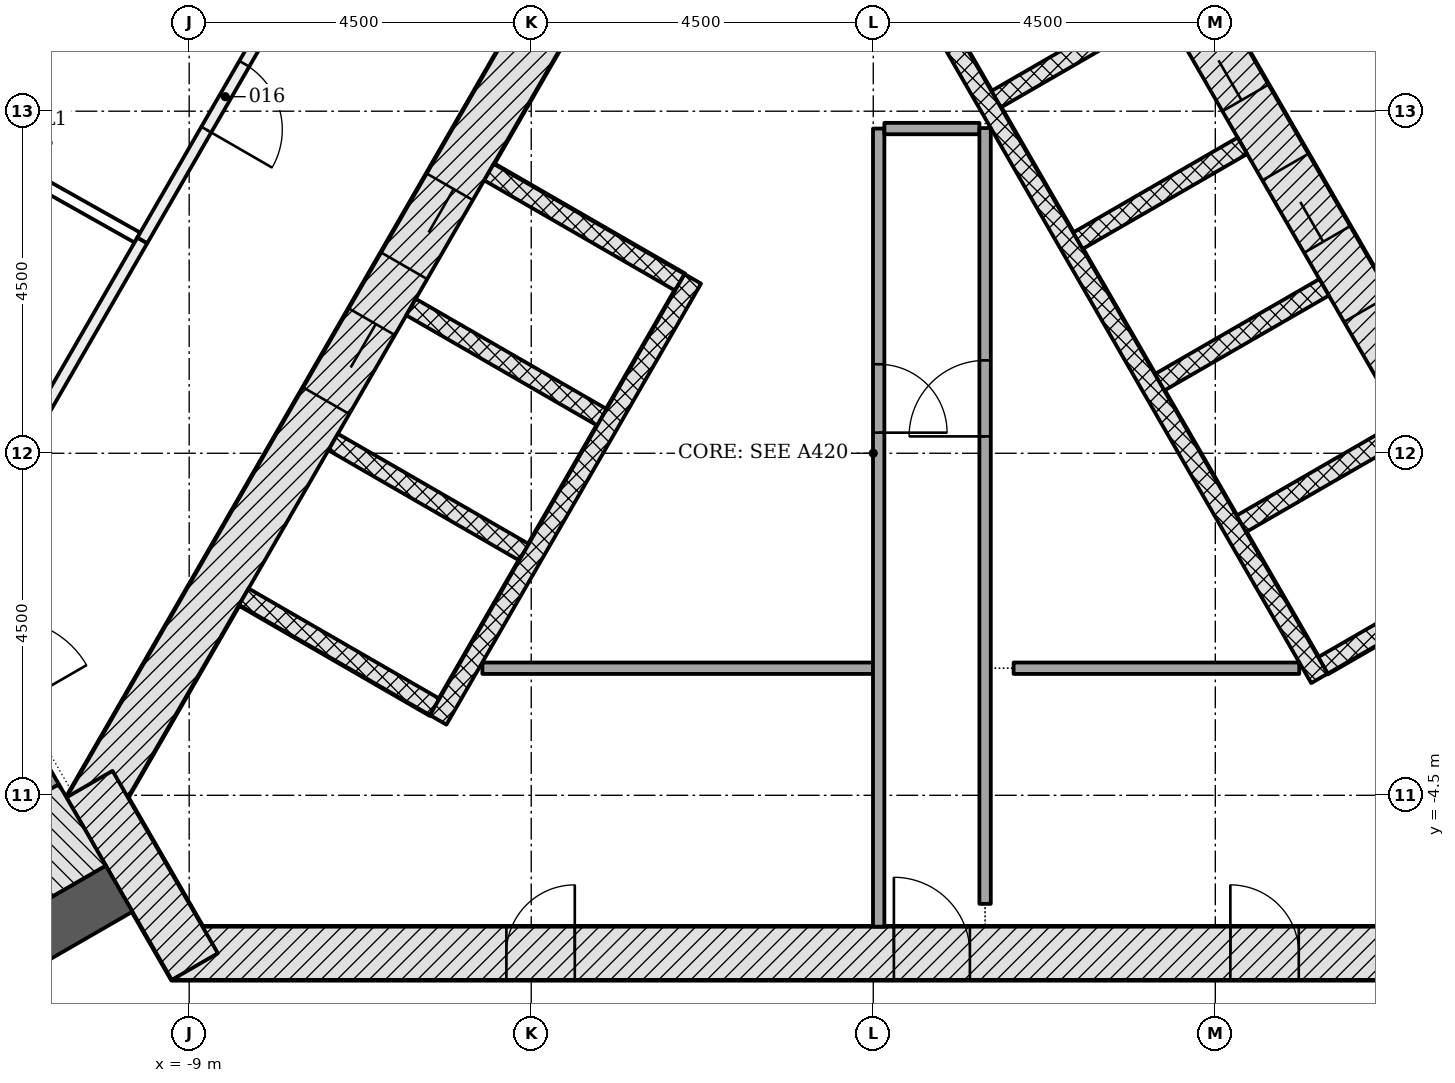
"""IFC4 building model, lengths in metres.
Left out: names, types, materials, properties, quantities, classifications, styles, units other than length and angle.
Written with IfcOpenShell. Run it as: python <this file> out.ifc"""

import sys

from ifc_helpers import new_model, si_unit, direction, frame, frame_2d, origin, place, context, subcontext, project, spatial, rectangle, extrude, element, fill, save


model = new_model("IFC4")
c1 = context("Model", 3, precision=1e-05, world=origin(), true_north=direction((0.0, 1.0)))
c2 = subcontext(c1, "Body", "Model", "MODEL_VIEW")
j1 = project(units=[si_unit("LENGTHUNIT", "METRE"), si_unit("PLANEANGLEUNIT", "RADIAN")], contexts=[c1])
p1 = place(None, origin())
s1 = spatial("IfcSite", under=j1, at=p1, CompositionType="ELEMENT")
p2 = place(p1, origin())
s2 = spatial("IfcBuilding", under=s1, at=p2, CompositionType="ELEMENT")
p3 = place(p2, frame((0.0, 0.0, 185.1)))
s3 = spatial("IfcBuildingStorey", under=s2, at=p3, CompositionType="ELEMENT", Elevation=185.1)
p4 = place(p3, frame((-9.229, -6.578, -0.2), z_axis=(0.0, 0.0, 1.0), x_axis=(1.0, 0.0, 0.0)))
e1 = element("IfcWall", 1, at=p4, inside=s3, PredefinedType="SHEAR", context=c2, shape_type="SweptSolid", body=[
    extrude(rectangle(XDim=18.458, YDim=0.7, at=frame_2d((9.229, 0.0))), origin(), (0.0, 0.0, 1.0), 3.6),
])
p5 = place(p4, frame((9.5, 0.0, 0.2)))
e2 = element("IfcOpeningElement", 2, at=p5, cuts=e1, PredefinedType="OPENING", context=c2, shape_type="SweptSolid", body=[
    extrude(rectangle(XDim=1.0, YDim=2.1, at=frame_2d((0.5, 1.05))), frame((0.0, 0.36, 0.0), z_axis=(0.0, -1.0, 0.0), x_axis=(1.0, 0.0, 0.0)), (0.0, 0.0, 1.0), 0.72),
])
p6 = place(p4, frame((4.402, 0.0, 0.2)))
e3 = element("IfcOpeningElement", 3, at=p6, cuts=e1, PredefinedType="OPENING", context=c2, shape_type="SweptSolid", body=[
    extrude(rectangle(XDim=0.9, YDim=2.1, at=frame_2d((0.45, 1.05))), frame((0.0, 0.36, 0.0), z_axis=(0.0, -1.0, 0.0), x_axis=(1.0, 0.0, 0.0)), (0.0, 0.0, 1.0), 0.72),
])
p7 = place(p4, frame((13.927, 0.0, 0.2)))
e4 = element("IfcOpeningElement", 4, at=p7, cuts=e1, PredefinedType="OPENING", context=c2, shape_type="SweptSolid", body=[
    extrude(rectangle(XDim=0.9, YDim=2.1, at=frame_2d((0.45, 1.05))), frame((0.0, 0.36, 0.0), z_axis=(0.0, -1.0, 0.0), x_axis=(1.0, 0.0, 0.0)), (0.0, 0.0, 1.0), 0.72),
])
p8 = place(p3, frame((10.311, -4.703, -0.2), z_axis=(0.0, 0.0, 1.0), x_axis=(-0.500001446645, 0.866024568562, 0.0)))
e5 = element("IfcWall", 5, at=p8, inside=s3, PredefinedType="SHEAR", context=c2, shape_type="SweptSolid", body=[
    extrude(rectangle(XDim=18.458, YDim=0.7, at=frame_2d((9.229, 0.0))), origin(), (0.0, 0.0, 1.0), 3.6),
])
p9 = place(p8, frame((4.379, 0.0, 0.2)))
e6 = element("IfcOpeningElement", 6, at=p9, cuts=e5, PredefinedType="OPENING", context=c2, shape_type="SweptSolid", body=[
    extrude(rectangle(XDim=1.1, YDim=2.1, at=frame_2d((0.55, 1.05))), frame((0.0, 0.36, 0.0), z_axis=(0.0, -1.0, 0.0), x_axis=(1.0, 0.0, 0.0)), (0.0, 0.0, 1.0), 0.72),
])
p10 = place(p8, frame((6.529, 0.0, 0.2)))
e7 = element("IfcOpeningElement", 7, at=p10, cuts=e5, PredefinedType="OPENING", context=c2, shape_type="SweptSolid", body=[
    extrude(rectangle(XDim=1.1, YDim=2.1, at=frame_2d((0.55, 1.05))), frame((0.0, 0.36, 0.0), z_axis=(0.0, -1.0, 0.0), x_axis=(1.0, 0.0, 0.0)), (0.0, 0.0, 1.0), 0.72),
])
p11 = place(p8, frame((8.679, 0.0, 0.2)))
e8 = element("IfcOpeningElement", 8, at=p11, cuts=e5, PredefinedType="OPENING", context=c2, shape_type="SweptSolid", body=[
    extrude(rectangle(XDim=1.1, YDim=2.1, at=frame_2d((0.55, 1.05))), frame((0.0, 0.36, 0.0), z_axis=(0.0, -1.0, 0.0), x_axis=(1.0, 0.0, 0.0)), (0.0, 0.0, 1.0), 0.72),
])
p12 = place(p8, frame((10.829, 0.0, 0.2)))
e9 = element("IfcOpeningElement", 9, at=p12, cuts=e5, PredefinedType="OPENING", context=c2, shape_type="SweptSolid", body=[
    extrude(rectangle(XDim=1.1, YDim=2.1, at=frame_2d((0.55, 1.05))), frame((0.0, 0.36, 0.0), z_axis=(0.0, -1.0, 0.0), x_axis=(1.0, 0.0, 0.0)), (0.0, 0.0, 1.0), 0.72),
])
p13 = place(p8, frame((12.979, 0.0, 0.2)))
e10 = element("IfcOpeningElement", 10, at=p13, cuts=e5, PredefinedType="OPENING", context=c2, shape_type="SweptSolid", body=[
    extrude(rectangle(XDim=1.1, YDim=2.1, at=frame_2d((0.55, 1.05))), frame((0.0, 0.36, 0.0), z_axis=(0.0, -1.0, 0.0), x_axis=(1.0, 0.0, 0.0)), (0.0, 0.0, 1.0), 0.72),
])
p14 = place(p3, frame((-1.083, 11.281, -0.2), z_axis=(0.0, 0.0, 1.0), x_axis=(-0.500001446645, -0.866024568562, 0.0)))
e11 = element("IfcWall", 11, at=p14, inside=s3, PredefinedType="SHEAR", context=c2, shape_type="SweptSolid", body=[
    extrude(rectangle(XDim=18.458, YDim=0.7, at=frame_2d((9.229, 0.0))), origin(), (0.0, 0.0, 1.0), 3.6),
])
p15 = place(p14, frame((8.979, 0.0, 0.2)))
e12 = element("IfcOpeningElement", 12, at=p15, cuts=e11, PredefinedType="OPENING", context=c2, shape_type="SweptSolid", body=[
    extrude(rectangle(XDim=1.2, YDim=2.1, at=frame_2d((0.6, 1.05))), frame((0.0, 0.36, 0.0), z_axis=(0.0, -1.0, 0.0), x_axis=(1.0, 0.0, 0.0)), (0.0, 0.0, 1.0), 0.72),
])
p16 = place(p14, frame((11.029, 0.0, 0.2)))
e13 = element("IfcOpeningElement", 13, at=p16, cuts=e11, PredefinedType="OPENING", context=c2, shape_type="SweptSolid", body=[
    extrude(rectangle(XDim=1.2, YDim=2.1, at=frame_2d((0.6, 1.05))), frame((0.0, 0.36, 0.0), z_axis=(0.0, -1.0, 0.0), x_axis=(1.0, 0.0, 0.0)), (0.0, 0.0, 1.0), 0.72),
])
p17 = place(p3, frame((-10.311, -4.353, -0.2), z_axis=(0.0, 0.0, 1.0), x_axis=(0.500042739161, -0.866000726912, 0.0)))
e14 = element("IfcWall", 14, at=p17, inside=s3, PredefinedType="SHEAR", context=c2, shape_type="SweptSolid", body=[
    extrude(rectangle(XDim=2.771, YDim=0.7, at=frame_2d((1.386, 0.0))), origin(), (0.0, 0.0, 1.0), 3.6),
])
p18 = place(p3, frame((-9.922, -5.728, -0.2), z_axis=(0.0, 0.0, 1.0), x_axis=(-0.866025463095, -0.499999897272, 0.0)))
e15 = element("IfcWall", 15, at=p18, inside=s3, PredefinedType="SHEAR", context=c2, shape_type="SweptSolid", body=[
    extrude(rectangle(XDim=9.521, YDim=0.7, at=frame_2d((4.761, 0.0))), origin(), (0.0, 0.0, 1.0), 3.6),
])
for number, where, z_axis, x_axis in (
    (16, (8.081, -1.541, -0.2), (0.0, 0.0, 1.0), (-0.866, -0.5, 0.0)),
    (17, (7.006, 0.321, -0.2), (0.0, 0.0, 1.0), (-0.866, -0.5, 0.0)),
):
    element("IfcWall", number, at=place(p3, frame(where, z_axis=z_axis, x_axis=x_axis)), inside=s3, PredefinedType="PARTITIONING", context=c2, shape_type="SweptSolid", body=[
        extrude(rectangle(XDim=2.5, YDim=0.25, at=frame_2d((1.25, 0.0))), origin(), (0.0, 0.0, 1.0), 3.6),
    ])
p19 = place(p3, frame((5.931, 2.183, -0.2), z_axis=(0.0, 0.0, 1.0), x_axis=(-0.866047370643, -0.499961950354, 0.0)))
e18 = element("IfcWall", 18, at=p19, inside=s3, PredefinedType="PARTITIONING", context=c2, shape_type="SweptSolid", body=[
    extrude(rectangle(XDim=2.5, YDim=0.25, at=frame_2d((1.25, 0.0))), origin(), (0.0, 0.0, 1.0), 3.6),
])
for number, where, z_axis, x_axis in (
    (19, (4.856, 4.045, -0.2), (0.0, 0.0, 1.0), (-0.866, -0.5, 0.0)),
    (20, (3.781, 5.907, -0.2), (0.0, 0.0, 1.0), (-0.866, -0.5, 0.0)),
):
    element("IfcWall", number, at=place(p3, frame(where, z_axis=z_axis, x_axis=x_axis)), inside=s3, PredefinedType="PARTITIONING", context=c2, shape_type="SweptSolid", body=[
        extrude(rectangle(XDim=2.5, YDim=0.25, at=frame_2d((1.25, 0.0))), origin(), (0.0, 0.0, 1.0), 3.6),
    ])
p20 = place(p3, frame((5.87, -2.961, 0.0), z_axis=(0.0, 0.0, 1.0), x_axis=(-0.50000615651, 0.866021849293, 0.0)))
e21 = element("IfcWall", 21, at=p20, inside=s3, PredefinedType="PARTITIONING", context=c2, shape_type="SweptSolid", body=[
    extrude(rectangle(XDim=11.0, YDim=0.25, at=frame_2d((5.5, 0.0))), origin(), (0.0, 0.0, 1.0), 3.4),
])
for number, where, z_axis, x_axis in (
    (22, (-5.056, 3.699, -0.2), (0.0, 0.0, 1.0), (0.866, -0.5, 0.0)),
    (23, (-6.081, 1.923, -0.2), (0.0, 0.0, 1.0), (0.866, -0.5, 0.0)),
    (24, (-7.106, 0.148, -0.2), (0.0, 0.0, 1.0), (0.866, -0.5, 0.0)),
    (25, (-8.281, -1.887, -0.2), (0.0, 0.0, 1.0), (0.866, -0.5, 0.0)),
):
    element("IfcWall", number, at=place(p3, frame(where, z_axis=z_axis, x_axis=x_axis)), inside=s3, PredefinedType="PARTITIONING", context=c2, shape_type="SweptSolid", body=[
        extrude(rectangle(XDim=2.9, YDim=0.25, at=frame_2d((1.45, 0.0))), origin(), (0.0, 0.0, 1.0), 3.6),
    ])
p21 = place(p3, frame((-2.374, 2.294, 0.0), z_axis=(0.0, 0.0, 1.0), x_axis=(-0.500003174267, -0.866023571113, 0.0)))
e26 = element("IfcWall", 26, at=p21, inside=s3, PredefinedType="PARTITIONING", context=c2, shape_type="SweptSolid", body=[
    extrude(rectangle(XDim=6.7, YDim=0.25, at=frame_2d((3.35, 0.0))), origin(), (0.0, 0.0, 1.0), 3.4),
])
p22 = place(p3, frame((-5.142, -2.828, 0.0), z_axis=(0.0, 0.0, 1.0), x_axis=(1.0, 0.0, 0.0)))
e27 = element("IfcWall", 27, at=p22, inside=s3, PredefinedType="PARTITIONING", context=c2, shape_type="SweptSolid", body=[
    extrude(rectangle(XDim=5.139, YDim=0.15, at=frame_2d((2.569, 0.0))), origin(), (0.0, 0.0, 1.0), 3.4),
])
p23 = place(p3, frame((0.071, 4.272, 0.0), z_axis=(0.0, 0.0, 1.0), x_axis=(0.0, -1.0, 0.0)))
e28 = element("IfcWall", 28, at=p23, inside=s3, PredefinedType="PARTITIONING", context=c2, shape_type="SweptSolid", body=[
    extrude(rectangle(XDim=10.5, YDim=0.15, at=frame_2d((5.25, 0.0))), origin(), (0.0, 0.0, 1.0), 3.4),
])
p24 = place(p23, frame((3.101, 0.0, 0.0)))
e29 = element("IfcOpeningElement", 29, at=p24, cuts=e28, PredefinedType="OPENING", context=c2, shape_type="SweptSolid", body=[
    extrude(rectangle(XDim=0.9, YDim=2.1, at=frame_2d((0.45, 1.05))), frame((0.0, 0.085, 0.0), z_axis=(0.0, -1.0, 0.0), x_axis=(1.0, 0.0, 0.0)), (0.0, 0.0, 1.0), 0.17),
])
p25 = place(p3, frame((0.146, 4.272, 0.0), z_axis=(0.0, 0.0, 1.0), x_axis=(1.0, 0.0, 0.0)))
e30 = element("IfcWall", 30, at=p25, inside=s3, PredefinedType="PARTITIONING", context=c2, shape_type="SweptSolid", body=[
    extrude(rectangle(XDim=1.25, YDim=0.15, at=frame_2d((0.625, 0.0))), origin(), (0.0, 0.0, 1.0), 3.4),
])
p26 = place(p3, frame((1.471, -5.928, 0.0), z_axis=(0.0, 0.0, 1.0), x_axis=(0.0, 1.0, 0.0)))
e31 = element("IfcWall", 31, at=p26, inside=s3, PredefinedType="PARTITIONING", context=c2, shape_type="SweptSolid", body=[
    extrude(rectangle(XDim=10.206, YDim=0.15, at=frame_2d((5.103, 0.0))), origin(), (0.0, 0.0, 1.0), 3.4),
])
p27 = place(p26, frame((6.15, 0.0, 0.0)))
e32 = element("IfcOpeningElement", 32, at=p27, cuts=e31, PredefinedType="OPENING", context=c2, shape_type="SweptSolid", body=[
    extrude(rectangle(XDim=1.0, YDim=2.1, at=frame_2d((0.5, 1.05))), frame((0.0, 0.085, 0.0), z_axis=(0.0, -1.0, 0.0), x_axis=(1.0, 0.0, 0.0)), (0.0, 0.0, 1.0), 0.17),
])
p28 = place(p3, frame((1.846, -2.828, 0.0), z_axis=(0.0, 0.0, 1.0), x_axis=(1.0, 0.0, 0.0)))
e33 = element("IfcWall", 33, at=p28, inside=s3, PredefinedType="PARTITIONING", context=c2, shape_type="SweptSolid", body=[
    extrude(rectangle(XDim=3.758, YDim=0.15, at=frame_2d((1.879, 0.0))), origin(), (0.0, 0.0, 1.0), 3.4),
])
p29 = place(p3, frame((-12.576, -1.331, -0.2), z_axis=(0.0, 0.0, 1.0), x_axis=(0.499970499736, -0.8660424351, 0.0)))
e34 = element("IfcWall", 34, at=p29, inside=s3, PredefinedType="SHEAR", context=c2, shape_type="SweptSolid", body=[
    extrude(rectangle(XDim=3.55, YDim=0.2, at=frame_2d((1.775, 0.0))), origin(), (0.0, 0.0, 1.0), 3.6),
])
p30 = place(p29, frame((1.175, 0.0, 0.2)))
e35 = element("IfcOpeningElement", 35, at=p30, cuts=e34, PredefinedType="OPENING", context=c2, shape_type="SweptSolid", body=[
    extrude(rectangle(XDim=1.2, YDim=2.1, at=frame_2d((0.6, 1.05))), frame((0.0, 0.11, 0.0), z_axis=(0.0, -1.0, 0.0), x_axis=(1.0, 0.0, 0.0)), (0.0, 0.0, 1.0), 0.22),
])
p31 = place(p3, frame((-10.406, -4.89, -0.2), z_axis=(0.0, 0.0, 1.0), x_axis=(-0.866018442252, -0.500012057535, 0.0)))
e36 = element("IfcWall", 36, at=p31, inside=s3, PredefinedType="SHEAR", context=c2, shape_type="SweptSolid", body=[
    extrude(rectangle(XDim=7.2, YDim=1.236, at=frame_2d((3.6, 0.0))), origin(), (0.0, 0.0, 1.0), 3.6),
])
p32 = place(p3, frame((11.247, -0.824, 0.0), z_axis=(0.0, 0.0, 1.0), x_axis=(-0.499997921847, 0.866026603603, 0.0)))
e37 = element("IfcWall", 37, at=p32, inside=s3, PredefinedType="PARTITIONING", context=c2, shape_type="SweptSolid", body=[
    extrude(rectangle(XDim=14.065, YDim=0.15, at=frame_2d((7.032, 0.0))), origin(), (0.0, 0.0, 1.0), 2.847),
])
p33 = place(p32, frame((11.953, 0.0, 0.0)))
e38 = element("IfcOpeningElement", 38, at=p33, cuts=e37, PredefinedType="OPENING", context=c2, shape_type="SweptSolid", body=[
    extrude(rectangle(XDim=1.0, YDim=2.1, at=frame_2d((0.5, 1.05))), frame((0.0, 0.085, 0.0), z_axis=(0.0, -1.0, 0.0), x_axis=(1.0, 0.0, 0.0)), (0.0, 0.0, 1.0), 0.17),
])
p34 = place(p3, frame((-9.616, 2.801, 0.0), z_axis=(0.0, 0.0, 1.0), x_axis=(-0.499995206172, -0.866028171485, 0.0)))
e39 = element("IfcWall", 39, at=p34, inside=s3, PredefinedType="PARTITIONING", context=c2, shape_type="SweptSolid", body=[
    extrude(rectangle(XDim=5.114, YDim=0.15, at=frame_2d((2.557, 0.0))), origin(), (0.0, 0.0, 1.0), 2.852),
])
p35 = place(p3, frame((-14.474, 5.536, 0.0), z_axis=(0.0, 0.0, 1.0), x_axis=(0.871324088074, -0.490707992132, 0.0)))
e40 = element("IfcWall", 40, at=p35, inside=s3, PredefinedType="PARTITIONING", context=c2, shape_type="SweptSolid", body=[
    extrude(rectangle(XDim=5.5, YDim=0.15, at=frame_2d((2.75, 0.0))), origin(), (0.0, 0.0, 1.0), 3.4),
])
p36 = place(p35, frame((2.287, 0.0, 0.0)))
e41 = element("IfcOpeningElement", 41, at=p36, cuts=e40, PredefinedType="OPENING", context=c2, shape_type="SweptSolid", body=[
    extrude(rectangle(XDim=1.0, YDim=2.1, at=frame_2d((0.5, 1.05))), frame((0.0, 0.085, 0.0), z_axis=(0.0, -1.0, 0.0), x_axis=(1.0, 0.0, 0.0)), (0.0, 0.0, 1.0), 0.17),
])
p37 = place(p3, frame((-7.434, 6.581, 0.0), z_axis=(0.0, 0.0, 1.0), x_axis=(-0.499964504253, -0.866045896294, 0.0)))
e42 = element("IfcWall", 42, at=p37, inside=s3, PredefinedType="PARTITIONING", context=c2, shape_type="SweptSolid", body=[
    extrude(rectangle(XDim=4.365, YDim=0.15, at=frame_2d((2.183, 0.0))), origin(), (0.0, 0.0, 1.0), 2.847),
])
p38 = place(p37, frame((1.683, 0.0, 0.0)))
e43 = element("IfcOpeningElement", 43, at=p38, cuts=e42, PredefinedType="OPENING", context=c2, shape_type="SweptSolid", body=[
    extrude(rectangle(XDim=1.0, YDim=2.1, at=frame_2d((0.5, 1.05))), frame((0.0, 0.085, 0.0), z_axis=(0.0, -1.0, 0.0), x_axis=(1.0, 0.0, 0.0)), (0.0, 0.0, 1.0), 0.17),
])
p39 = place(p10, origin())
e44 = element("IfcDoor", 44, at=p39, inside=s3, OperationType="DOUBLE_DOOR_SLIDING", PredefinedType="DOOR", context=c2, shape_type="SweptSolid", body=[
    extrude(rectangle(XDim=1.1, YDim=2.1, at=frame_2d((0.55, 1.05))), frame((0.0, 0.025, 0.0), z_axis=(0.0, -1.0, 0.0), x_axis=(1.0, 0.0, 0.0)), (0.0, 0.0, 1.0), 0.05),
])
fill(e7, e44)
p40 = place(p11, origin())
e45 = element("IfcDoor", 45, at=p40, inside=s3, OperationType="DOUBLE_DOOR_SLIDING", PredefinedType="DOOR", context=c2, shape_type="SweptSolid", body=[
    extrude(rectangle(XDim=1.1, YDim=2.1, at=frame_2d((0.55, 1.05))), frame((0.0, 0.025, 0.0), z_axis=(0.0, -1.0, 0.0), x_axis=(1.0, 0.0, 0.0)), (0.0, 0.0, 1.0), 0.05),
])
fill(e8, e45)
p41 = place(p12, origin())
e46 = element("IfcDoor", 46, at=p41, inside=s3, OperationType="DOUBLE_DOOR_SLIDING", PredefinedType="DOOR", context=c2, shape_type="SweptSolid", body=[
    extrude(rectangle(XDim=1.1, YDim=2.1, at=frame_2d((0.55, 1.05))), frame((0.0, 0.025, 0.0), z_axis=(0.0, -1.0, 0.0), x_axis=(1.0, 0.0, 0.0)), (0.0, 0.0, 1.0), 0.05),
])
fill(e9, e46)
p42 = place(p15, origin())
e47 = element("IfcDoor", 47, at=p42, inside=s3, OperationType="DOUBLE_DOOR_SLIDING", PredefinedType="DOOR", context=c2, shape_type="SweptSolid", body=[
    extrude(rectangle(XDim=1.2, YDim=2.1, at=frame_2d((0.6, 1.05))), frame((0.0, 0.025, 0.0), z_axis=(0.0, -1.0, 0.0), x_axis=(1.0, 0.0, 0.0)), (0.0, 0.0, 1.0), 0.05),
])
fill(e12, e47)
p43 = place(p16, origin())
e48 = element("IfcDoor", 48, at=p43, inside=s3, OperationType="DOUBLE_DOOR_SLIDING", PredefinedType="DOOR", context=c2, shape_type="SweptSolid", body=[
    extrude(rectangle(XDim=1.2, YDim=2.1, at=frame_2d((0.6, 1.05))), frame((0.0, 0.025, 0.0), z_axis=(0.0, -1.0, 0.0), x_axis=(1.0, 0.0, 0.0)), (0.0, 0.0, 1.0), 0.05),
])
fill(e13, e48)
p44 = place(p5, origin())
e49 = element("IfcDoor", 49, at=p44, inside=s3, OperationType="SINGLE_SWING_LEFT", PredefinedType="DOOR", context=c2, shape_type="SweptSolid", body=[
    extrude(rectangle(XDim=1.0, YDim=2.1, at=frame_2d((0.5, 1.05))), frame((0.0, 0.075, 0.0), z_axis=(0.0, -1.0, 0.0), x_axis=(1.0, 0.0, 0.0)), (0.0, 0.0, 1.0), 0.15),
])
fill(e2, e49)
p45 = place(p6, origin())
e50 = element("IfcDoor", 50, at=p45, inside=s3, OperationType="SINGLE_SWING_RIGHT", PredefinedType="DOOR", context=c2, shape_type="SweptSolid", body=[
    extrude(rectangle(XDim=0.9, YDim=2.1, at=frame_2d((0.45, 1.05))), frame((0.0, 0.075, 0.0), z_axis=(0.0, -1.0, 0.0), x_axis=(1.0, 0.0, 0.0)), (0.0, 0.0, 1.0), 0.15),
])
fill(e3, e50)
p46 = place(p7, origin())
e51 = element("IfcDoor", 51, at=p46, inside=s3, OperationType="SINGLE_SWING_LEFT", PredefinedType="DOOR", context=c2, shape_type="SweptSolid", body=[
    extrude(rectangle(XDim=0.9, YDim=2.1, at=frame_2d((0.45, 1.05))), frame((0.0, 0.075, 0.0), z_axis=(0.0, -1.0, 0.0), x_axis=(1.0, 0.0, 0.0)), (0.0, 0.0, 1.0), 0.15),
])
fill(e4, e51)
p47 = place(p24, origin())
e52 = element("IfcDoor", 52, at=p47, inside=s3, OperationType="SINGLE_SWING_RIGHT", PredefinedType="DOOR", context=c2, shape_type="SweptSolid", body=[
    extrude(rectangle(XDim=0.9, YDim=2.1, at=frame_2d((0.45, 1.05))), frame((0.0, 0.025, 0.0), z_axis=(0.0, -1.0, 0.0), x_axis=(1.0, 0.0, 0.0)), (0.0, 0.0, 1.0), 0.05),
])
fill(e29, e52)
p48 = place(p27, origin())
e53 = element("IfcDoor", 53, at=p48, inside=s3, OperationType="SINGLE_SWING_LEFT", PredefinedType="DOOR", context=c2, shape_type="SweptSolid", body=[
    extrude(rectangle(XDim=1.0, YDim=2.1, at=frame_2d((0.5, 1.05))), frame((0.0, 0.025, 0.0), z_axis=(0.0, -1.0, 0.0), x_axis=(1.0, 0.0, 0.0)), (0.0, 0.0, 1.0), 0.05),
])
fill(e32, e53)
p49 = place(p38, origin())
e54 = element("IfcDoor", 54, at=p49, inside=s3, OperationType="SINGLE_SWING_RIGHT", PredefinedType="DOOR", context=c2, shape_type="SweptSolid", body=[
    extrude(rectangle(XDim=1.0, YDim=2.1, at=frame_2d((0.5, 1.05))), frame((0.0, 0.025, 0.0), z_axis=(0.0, -1.0, 0.0), x_axis=(1.0, 0.0, 0.0)), (0.0, 0.0, 1.0), 0.05),
])
fill(e43, e54)
save(model, sys.argv[1])
